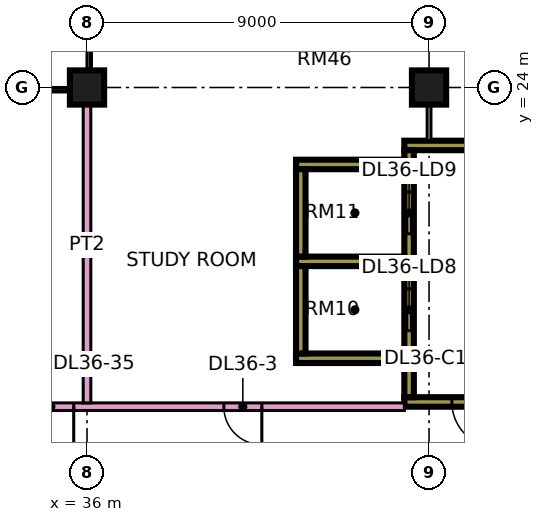
"""IFC4 building model, lengths in metres.
Left out: names, types, materials, properties, quantities, classifications, styles, units other than length and angle.
Written with IfcOpenShell. Run it as: python <this file> out.ifc"""

import sys

from ifc_helpers import new_model, si_unit, direction, frame, frame_2d, origin, origin_2d, place, context, subcontext, project, spatial, rectangle, extrude, element, fill, save


model = new_model("IFC4")
c1 = context("Model", 3, precision=1e-05, world=origin(), true_north=direction((0.0, 1.0)))
c2 = subcontext(c1, "Body", "Model", "MODEL_VIEW")
j1 = project(units=[si_unit("LENGTHUNIT", "METRE"), si_unit("PLANEANGLEUNIT", "RADIAN")], contexts=[c1])
p1 = place(None, origin())
s1 = spatial("IfcSite", under=j1, at=p1, CompositionType="ELEMENT")
p2 = place(p1, origin())
s2 = spatial("IfcBuilding", under=s1, at=p2, CompositionType="ELEMENT")
p3 = place(p2, frame((0.0, 0.0, 161.15)))
s3 = spatial("IfcBuildingStorey", under=s2, at=p3, CompositionType="ELEMENT", Elevation=161.15)
for number, where, z_axis, x_axis in (
    (1, (36.0, 24.0, 0.0), (0.0, 0.0, 1.0), (1.0, 0.0, 0.0)),
    (2, (45.0, 24.0, 0.0), (0.0, 0.0, 1.0), (1.0, 0.0, 0.0)),
):
    element("IfcColumn", number, at=place(p3, frame(where, z_axis=z_axis, x_axis=x_axis)), inside=s3, PredefinedType="COLUMN", context=c2, shape_type="SweptSolid", body=[
        extrude(rectangle(XDim=0.9, YDim=0.9, at=origin_2d()), origin(), (0.0, 0.0, 1.0), 3.75),
    ])
p4 = place(p3, frame((44.35, 15.725, 0.0), z_axis=(0.0, 0.0, 1.0), x_axis=(1.0, 0.0, 0.0)))
e3 = element("IfcWall", 3, at=p4, inside=s3, PredefinedType="SHEAR", context=c2, shape_type="SweptSolid", body=[
    extrude(rectangle(XDim=3.425, YDim=0.25, at=frame_2d((1.712, 0.0))), origin(), (0.0, 0.0, 1.0), 3.75),
])
p5 = place(p4, frame((1.25, 0.0, 0.0)))
e4 = element("IfcOpeningElement", 4, at=p5, cuts=e3, PredefinedType="OPENING", context=c2, shape_type="SweptSolid", body=[
    extrude(rectangle(XDim=1.2, YDim=2.2, at=frame_2d((0.6, 1.1))), frame((0.0, 0.135, 0.0), z_axis=(0.0, -1.0, 0.0), x_axis=(1.0, 0.0, 0.0)), (0.0, 0.0, 1.0), 0.27),
])
p6 = place(p3, frame((44.35, 22.475, 0.0), z_axis=(0.0, 0.0, 1.0), x_axis=(1.0, 0.0, 0.0)))
e5 = element("IfcWall", 5, at=p6, inside=s3, PredefinedType="SHEAR", context=c2, shape_type="SweptSolid", body=[
    extrude(rectangle(XDim=3.425, YDim=0.25, at=frame_2d((1.712, 0.0))), origin(), (0.0, 0.0, 1.0), 3.75),
])
p7 = place(p3, frame((44.475, 15.85, 0.0), z_axis=(0.0, 0.0, 1.0), x_axis=(0.0, 1.0, 0.0)))
e6 = element("IfcWall", 6, at=p7, inside=s3, PredefinedType="SHEAR", context=c2, shape_type="SweptSolid", body=[
    extrude(rectangle(XDim=6.5, YDim=0.25, at=frame_2d((3.25, 0.0))), origin(), (0.0, 0.0, 1.0), 3.75),
])
p8 = place(p7, frame((1.75, 0.0, 0.0)))
e7 = element("IfcOpeningElement", 7, at=p8, cuts=e6, PredefinedType="OPENING", context=c2, shape_type="SweptSolid", body=[
    extrude(rectangle(XDim=1.1, YDim=2.2, at=frame_2d((0.55, 1.1))), frame((0.0, 0.135, 0.0), z_axis=(0.0, -1.0, 0.0), x_axis=(1.0, 0.0, 0.0)), (0.0, 0.0, 1.0), 0.27),
])
p9 = place(p7, frame((4.3, 0.0, 0.0)))
e8 = element("IfcOpeningElement", 8, at=p9, cuts=e6, PredefinedType="OPENING", context=c2, shape_type="SweptSolid", body=[
    extrude(rectangle(XDim=1.1, YDim=2.2, at=frame_2d((0.55, 1.1))), frame((0.0, 0.135, 0.0), z_axis=(0.0, -1.0, 0.0), x_axis=(1.0, 0.0, 0.0)), (0.0, 0.0, 1.0), 0.27),
])
for number, where, z_axis, x_axis in (
    (9, (41.5, 16.875, 0.0), (0.0, 0.0, 1.0), (1.0, 0.0, 0.0)),
    (10, (41.5, 19.425, 0.0), (0.0, 0.0, 1.0), (1.0, 0.0, 0.0)),
    (11, (41.5, 21.975, 0.0), (0.0, 0.0, 1.0), (1.0, 0.0, 0.0)),
):
    element("IfcWall", number, at=place(p3, frame(where, z_axis=z_axis, x_axis=x_axis)), inside=s3, PredefinedType="SHEAR", context=c2, shape_type="SweptSolid", body=[
        extrude(rectangle(XDim=2.85, YDim=0.25, at=frame_2d((1.425, 0.0))), origin(), (0.0, 0.0, 1.0), 3.75),
    ])
for number, where, z_axis, x_axis in (
    (12, (41.625, 17.0, 0.0), (0.0, 0.0, 1.0), (0.0, 1.0, 0.0)),
    (13, (41.625, 19.55, 0.0), (0.0, 0.0, 1.0), (0.0, 1.0, 0.0)),
):
    element("IfcWall", number, at=place(p3, frame(where, z_axis=z_axis, x_axis=x_axis)), inside=s3, PredefinedType="SHEAR", context=c2, shape_type="SweptSolid", body=[
        extrude(rectangle(XDim=2.3, YDim=0.25, at=frame_2d((1.15, 0.0))), origin(), (0.0, 0.0, 1.0), 3.75),
    ])
p10 = place(p3, frame((34.0, 15.6, 0.0), z_axis=(0.0, 0.0, 1.0), x_axis=(1.0, 0.0, 0.0)))
e14 = element("IfcWall", 14, at=p10, inside=s3, PredefinedType="PARTITIONING", context=c2, shape_type="SweptSolid", body=[
    extrude(rectangle(XDim=10.35, YDim=0.2, at=frame_2d((5.175, 0.0))), origin(), (0.0, 0.0, 1.0), 3.35),
])
p11 = place(p10, frame((5.6, 0.0, 0.0)))
e15 = element("IfcOpeningElement", 15, at=p11, cuts=e14, PredefinedType="OPENING", context=c2, shape_type="SweptSolid", body=[
    extrude(rectangle(XDim=1.0, YDim=2.1, at=frame_2d((0.5, 1.05))), frame((0.0, 0.11, 0.0), z_axis=(0.0, -1.0, 0.0), x_axis=(1.0, 0.0, 0.0)), (0.0, 0.0, 1.0), 0.22),
])
p12 = place(p10, frame((0.45, 0.0, 0.0)))
e16 = element("IfcOpeningElement", 16, at=p12, cuts=e14, PredefinedType="OPENING", context=c2, shape_type="SweptSolid", body=[
    extrude(rectangle(XDim=1.2, YDim=2.1, at=frame_2d((0.6, 1.05))), frame((0.0, 0.11, 0.0), z_axis=(0.0, -1.0, 0.0), x_axis=(1.0, 0.0, 0.0)), (0.0, 0.0, 1.0), 0.22),
])
p13 = place(p3, frame((36.0, 15.7, 0.0), z_axis=(0.0, 0.0, 1.0), x_axis=(0.0, 1.0, 0.0)))
e17 = element("IfcWall", 17, at=p13, inside=s3, PredefinedType="PARTITIONING", context=c2, shape_type="SweptSolid", body=[
    extrude(rectangle(XDim=8.3, YDim=0.2, at=frame_2d((4.15, 0.0))), origin(), (0.0, 0.0, 1.0), 3.35),
])
p14 = place(p3, frame((45.0, 22.6, 0.0), z_axis=(0.0, 0.0, 1.0), x_axis=(0.0, 1.0, 0.0)))
e18 = element("IfcWall", 18, at=p14, inside=s3, PredefinedType="PARTITIONING", context=c2, shape_type="SweptSolid", body=[
    extrude(rectangle(XDim=1.4, YDim=0.1, at=frame_2d((0.7, 0.0))), origin(), (0.0, 0.0, 1.0), 3.35),
])
p15 = place(p5, origin())
e19 = element("IfcDoor", 19, at=p15, inside=s3, OperationType="SINGLE_SWING_RIGHT", PredefinedType="DOOR", context=c2, shape_type="SweptSolid", body=[
    extrude(rectangle(XDim=1.2, YDim=2.2, at=frame_2d((0.6, 1.1))), frame((0.0, 0.025, 0.0), z_axis=(0.0, -1.0, 0.0), x_axis=(1.0, 0.0, 0.0)), (0.0, 0.0, 1.0), 0.05),
])
fill(e4, e19)
p16 = place(p8, origin())
e20 = element("IfcDoor", 20, at=p16, inside=s3, OperationType="DOUBLE_DOOR_SLIDING", PredefinedType="DOOR", context=c2, shape_type="SweptSolid", body=[
    extrude(rectangle(XDim=1.1, YDim=2.2, at=frame_2d((0.55, 1.1))), frame((0.0, 0.025, 0.0), z_axis=(0.0, -1.0, 0.0), x_axis=(1.0, 0.0, 0.0)), (0.0, 0.0, 1.0), 0.05),
])
fill(e7, e20)
p17 = place(p9, origin())
e21 = element("IfcDoor", 21, at=p17, inside=s3, OperationType="DOUBLE_DOOR_SLIDING", PredefinedType="DOOR", context=c2, shape_type="SweptSolid", body=[
    extrude(rectangle(XDim=1.1, YDim=2.2, at=frame_2d((0.55, 1.1))), frame((0.0, 0.025, 0.0), z_axis=(0.0, -1.0, 0.0), x_axis=(1.0, 0.0, 0.0)), (0.0, 0.0, 1.0), 0.05),
])
fill(e8, e21)
p18 = place(p11, origin())
e22 = element("IfcDoor", 22, at=p18, inside=s3, OperationType="SINGLE_SWING_RIGHT", PredefinedType="DOOR", context=c2, shape_type="SweptSolid", body=[
    extrude(rectangle(XDim=1.0, YDim=2.1, at=frame_2d((0.5, 1.05))), frame((0.0, 0.025, 0.0), z_axis=(0.0, -1.0, 0.0), x_axis=(1.0, 0.0, 0.0)), (0.0, 0.0, 1.0), 0.05),
])
fill(e15, e22)
p19 = place(p12, origin())
e23 = element("IfcDoor", 23, at=p19, inside=s3, OperationType="SINGLE_SWING_RIGHT", PredefinedType="DOOR", context=c2, shape_type="SweptSolid", body=[
    extrude(rectangle(XDim=1.2, YDim=2.1, at=frame_2d((0.6, 1.05))), frame((0.0, 0.025, 0.0), z_axis=(0.0, -1.0, 0.0), x_axis=(1.0, 0.0, 0.0)), (0.0, 0.0, 1.0), 0.05),
])
fill(e16, e23)
save(model, sys.argv[1])
